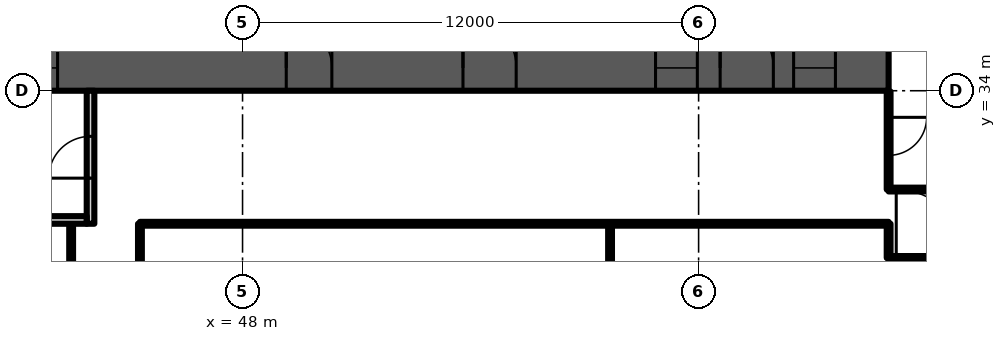
"""IFC4 building model, lengths in metres.
Left out: names, types, materials, properties, quantities, classifications, styles, units other than length and angle.
Written with IfcOpenShell. Run it as: python <this file> out.ifc"""

import sys

from ifc_helpers import new_model, si_unit, direction, frame, frame_2d, origin, place, context, subcontext, project, spatial, rectangle, extrude, element, fill, save


model = new_model("IFC4")
c1 = context("Model", 3, precision=1e-05, world=origin(), true_north=direction((0.0, 1.0)))
c2 = subcontext(c1, "Body", "Model", "MODEL_VIEW")
j1 = project(units=[si_unit("LENGTHUNIT", "METRE"), si_unit("PLANEANGLEUNIT", "RADIAN")], contexts=[c1])
p1 = place(None, origin())
s1 = spatial("IfcSite", under=j1, at=p1, CompositionType="ELEMENT")
p2 = place(p1, origin())
s2 = spatial("IfcBuilding", under=s1, at=p2, CompositionType="ELEMENT")
p3 = place(p2, frame((0.0, 0.0, 81.1)))
s3 = spatial("IfcBuildingStorey", under=s2, at=p3, CompositionType="ELEMENT", Elevation=81.1)
p4 = place(p3, frame((9.0, 34.6, 0.0), z_axis=(0.0, 0.0, 1.0), x_axis=(1.0, 0.0, 0.0)))
e1 = element("IfcWall", 1, at=p4, inside=s3, PredefinedType="SHEAR", context=c2, shape_type="SweptSolid", body=[
    extrude(rectangle(XDim=56.0, YDim=1.2, at=frame_2d((28.0, 0.0))), origin(), (0.0, 0.0, 1.0), 3.6),
])
p5 = place(p4, frame((2.0, 0.0, 0.0)))
e2 = element("IfcOpeningElement", 2, at=p5, cuts=e1, PredefinedType="OPENING", context=c2, shape_type="SweptSolid", body=[
    extrude(rectangle(XDim=1.0, YDim=2.1, at=frame_2d((0.5, 1.05))), frame((0.0, 0.61, 0.0), z_axis=(0.0, -1.0, 0.0), x_axis=(1.0, 0.0, 0.0)), (0.0, 0.0, 1.0), 1.22),
])
p6 = place(p4, frame((4.6, 0.0, 0.0)))
e3 = element("IfcOpeningElement", 3, at=p6, cuts=e1, PredefinedType="OPENING", context=c2, shape_type="SweptSolid", body=[
    extrude(rectangle(XDim=1.0, YDim=2.1, at=frame_2d((0.5, 1.05))), frame((0.0, 0.61, 0.0), z_axis=(0.0, -1.0, 0.0), x_axis=(1.0, 0.0, 0.0)), (0.0, 0.0, 1.0), 1.22),
])
p7 = place(p4, frame((7.867, 0.0, 0.0)))
e4 = element("IfcOpeningElement", 4, at=p7, cuts=e1, PredefinedType="OPENING", context=c2, shape_type="SweptSolid", body=[
    extrude(rectangle(XDim=1.1, YDim=2.1, at=frame_2d((0.55, 1.05))), frame((0.0, 0.61, 0.0), z_axis=(0.0, -1.0, 0.0), x_axis=(1.0, 0.0, 0.0)), (0.0, 0.0, 1.0), 1.22),
])
p8 = place(p4, frame((12.033, 0.0, 0.0)))
e5 = element("IfcOpeningElement", 5, at=p8, cuts=e1, PredefinedType="OPENING", context=c2, shape_type="SweptSolid", body=[
    extrude(rectangle(XDim=1.1, YDim=2.1, at=frame_2d((0.55, 1.05))), frame((0.0, 0.61, 0.0), z_axis=(0.0, -1.0, 0.0), x_axis=(1.0, 0.0, 0.0)), (0.0, 0.0, 1.0), 1.22),
])
p9 = place(p4, frame((9.8, 0.0, 0.0)))
e6 = element("IfcOpeningElement", 6, at=p9, cuts=e1, PredefinedType="OPENING", context=c2, shape_type="SweptSolid", body=[
    extrude(rectangle(XDim=1.4, YDim=2.1, at=frame_2d((0.7, 1.05))), frame((0.0, 0.61, 0.0), z_axis=(0.0, -1.0, 0.0), x_axis=(1.0, 0.0, 0.0)), (0.0, 0.0, 1.0), 1.22),
])
p10 = place(p4, frame((14.65, 0.0, 0.0)))
e7 = element("IfcOpeningElement", 7, at=p10, cuts=e1, PredefinedType="OPENING", context=c2, shape_type="SweptSolid", body=[
    extrude(rectangle(XDim=1.2, YDim=2.1, at=frame_2d((0.6, 1.05))), frame((0.0, 0.61, 0.0), z_axis=(0.0, -1.0, 0.0), x_axis=(1.0, 0.0, 0.0)), (0.0, 0.0, 1.0), 1.22),
])
p11 = place(p4, frame((21.867, 0.0, 0.0)))
e8 = element("IfcOpeningElement", 8, at=p11, cuts=e1, PredefinedType="OPENING", context=c2, shape_type="SweptSolid", body=[
    extrude(rectangle(XDim=1.1, YDim=2.1, at=frame_2d((0.55, 1.05))), frame((0.0, 0.61, 0.0), z_axis=(0.0, -1.0, 0.0), x_axis=(1.0, 0.0, 0.0)), (0.0, 0.0, 1.0), 1.22),
])
p12 = place(p4, frame((26.033, 0.0, 0.0)))
e9 = element("IfcOpeningElement", 9, at=p12, cuts=e1, PredefinedType="OPENING", context=c2, shape_type="SweptSolid", body=[
    extrude(rectangle(XDim=1.1, YDim=2.1, at=frame_2d((0.55, 1.05))), frame((0.0, 0.61, 0.0), z_axis=(0.0, -1.0, 0.0), x_axis=(1.0, 0.0, 0.0)), (0.0, 0.0, 1.0), 1.22),
])
p13 = place(p4, frame((23.8, 0.0, 0.0)))
e10 = element("IfcOpeningElement", 10, at=p13, cuts=e1, PredefinedType="OPENING", context=c2, shape_type="SweptSolid", body=[
    extrude(rectangle(XDim=1.4, YDim=2.1, at=frame_2d((0.7, 1.05))), frame((0.0, 0.61, 0.0), z_axis=(0.0, -1.0, 0.0), x_axis=(1.0, 0.0, 0.0)), (0.0, 0.0, 1.0), 1.22),
])
p14 = place(p4, frame((28.867, 0.0, 0.0)))
e11 = element("IfcOpeningElement", 11, at=p14, cuts=e1, PredefinedType="OPENING", context=c2, shape_type="SweptSolid", body=[
    extrude(rectangle(XDim=1.1, YDim=2.1, at=frame_2d((0.55, 1.05))), frame((0.0, 0.61, 0.0), z_axis=(0.0, -1.0, 0.0), x_axis=(1.0, 0.0, 0.0)), (0.0, 0.0, 1.0), 1.22),
])
p15 = place(p4, frame((33.033, 0.0, 0.0)))
e12 = element("IfcOpeningElement", 12, at=p15, cuts=e1, PredefinedType="OPENING", context=c2, shape_type="SweptSolid", body=[
    extrude(rectangle(XDim=1.1, YDim=2.1, at=frame_2d((0.55, 1.05))), frame((0.0, 0.61, 0.0), z_axis=(0.0, -1.0, 0.0), x_axis=(1.0, 0.0, 0.0)), (0.0, 0.0, 1.0), 1.22),
])
p16 = place(p4, frame((40.15, 0.0, 0.0)))
e13 = element("IfcOpeningElement", 13, at=p16, cuts=e1, PredefinedType="OPENING", context=c2, shape_type="SweptSolid", body=[
    extrude(rectangle(XDim=1.2, YDim=2.1, at=frame_2d((0.6, 1.05))), frame((0.0, 0.61, 0.0), z_axis=(0.0, -1.0, 0.0), x_axis=(1.0, 0.0, 0.0)), (0.0, 0.0, 1.0), 1.22),
])
p17 = place(p4, frame((44.8, 0.0, 0.0)))
e14 = element("IfcOpeningElement", 14, at=p17, cuts=e1, PredefinedType="OPENING", context=c2, shape_type="SweptSolid", body=[
    extrude(rectangle(XDim=1.4, YDim=2.1, at=frame_2d((0.7, 1.05))), frame((0.0, 0.61, 0.0), z_axis=(0.0, -1.0, 0.0), x_axis=(1.0, 0.0, 0.0)), (0.0, 0.0, 1.0), 1.22),
])
p18 = place(p4, frame((49.867, 0.0, 0.0)))
e15 = element("IfcOpeningElement", 15, at=p18, cuts=e1, PredefinedType="OPENING", context=c2, shape_type="SweptSolid", body=[
    extrude(rectangle(XDim=1.1, YDim=2.1, at=frame_2d((0.55, 1.05))), frame((0.0, 0.61, 0.0), z_axis=(0.0, -1.0, 0.0), x_axis=(1.0, 0.0, 0.0)), (0.0, 0.0, 1.0), 1.22),
])
p19 = place(p4, frame((53.5, 0.0, 0.0)))
e16 = element("IfcOpeningElement", 16, at=p19, cuts=e1, PredefinedType="OPENING", context=c2, shape_type="SweptSolid", body=[
    extrude(rectangle(XDim=1.1, YDim=2.1, at=frame_2d((0.55, 1.05))), frame((0.0, 0.61, 0.0), z_axis=(0.0, -1.0, 0.0), x_axis=(1.0, 0.0, 0.0)), (0.0, 0.0, 1.0), 1.22),
])
p20 = place(p4, frame((51.567, 0.0, 0.0)))
e17 = element("IfcOpeningElement", 17, at=p20, cuts=e1, PredefinedType="OPENING", context=c2, shape_type="SweptSolid", body=[
    extrude(rectangle(XDim=1.4, YDim=2.1, at=frame_2d((0.7, 1.05))), frame((0.0, 0.61, 0.0), z_axis=(0.0, -1.0, 0.0), x_axis=(1.0, 0.0, 0.0)), (0.0, 0.0, 1.0), 1.22),
])
p21 = place(p3, frame((44.0, 30.5, 0.0), z_axis=(0.0, 0.0, 1.0), x_axis=(0.0, 1.0, 0.0)))
e18 = element("IfcWall", 18, at=p21, inside=s3, PredefinedType="PARTITIONING", context=c2, shape_type="SweptSolid", body=[
    extrude(rectangle(XDim=3.5, YDim=0.2, at=frame_2d((1.75, 0.0))), origin(), (0.0, 0.0, 1.0), 3.2),
])
p22 = place(p21, frame((1.2, 0.0, 0.0)))
e19 = element("IfcOpeningElement", 19, at=p22, cuts=e18, PredefinedType="OPENING", context=c2, shape_type="SweptSolid", body=[
    extrude(rectangle(XDim=1.1, YDim=2.1, at=frame_2d((0.55, 1.05))), frame((0.0, 0.11, 0.0), z_axis=(0.0, -1.0, 0.0), x_axis=(1.0, 0.0, 0.0)), (0.0, 0.0, 1.0), 0.22),
])
p23 = place(p3, frame((41.1, 30.6, 0.0), z_axis=(0.0, 0.0, 1.0), x_axis=(1.0, 0.0, 0.0)))
e20 = element("IfcWall", 20, at=p23, inside=s3, PredefinedType="PARTITIONING", context=c2, shape_type="SweptSolid", body=[
    extrude(rectangle(XDim=2.8, YDim=0.2, at=frame_2d((1.4, 0.0))), origin(), (0.0, 0.0, 1.0), 3.2),
])
p24 = place(p3, frame((43.49, 13.24, 0.0), z_axis=(0.0, 0.0, 1.0), x_axis=(0.0, 1.0, 0.0)))
e21 = element("IfcWall", 21, at=p24, inside=s3, PredefinedType="PARTITIONING", context=c2, shape_type="SweptSolid", body=[
    extrude(rectangle(XDim=17.25, YDim=0.1, at=frame_2d((8.625, 0.0))), origin(), (0.0, 0.0, 1.0), 3.2),
])
p25 = place(p24, frame((8.139, 0.0, 0.0)))
e22 = element("IfcOpeningElement", 22, at=p25, cuts=e21, PredefinedType="OPENING", context=c2, shape_type="SweptSolid", body=[
    extrude(rectangle(XDim=1.0, YDim=2.1, at=frame_2d((0.5, 1.05))), frame((0.0, 0.06, 0.0), z_axis=(0.0, -1.0, 0.0), x_axis=(1.0, 0.0, 0.0)), (0.0, 0.0, 1.0), 0.12),
])
p26 = place(p3, frame((45.3, -3.943, 0.0), z_axis=(0.0, 0.0, 1.0), x_axis=(0.0, 1.0, 0.0)))
e23 = element("IfcWall", 23, at=p26, inside=s3, PredefinedType="PARTITIONING", context=c2, shape_type="SweptSolid", body=[
    extrude(rectangle(XDim=34.443, YDim=0.1, at=frame_2d((17.222, 0.0))), origin(), (0.0, 0.0, 1.0), 2.58),
])
p27 = place(p26, frame((1.598, 0.0, 0.0)))
e24 = element("IfcOpeningElement", 24, at=p27, cuts=e23, PredefinedType="OPENING", context=c2, shape_type="SweptSolid", body=[
    extrude(rectangle(XDim=1.0, YDim=2.1, at=frame_2d((0.5, 1.05))), frame((0.0, 0.06, 0.0), z_axis=(0.0, -1.0, 0.0), x_axis=(1.0, 0.0, 0.0)), (0.0, 0.0, 1.0), 0.12),
])
p28 = place(p26, frame((5.853, 0.0, 0.0)))
e25 = element("IfcOpeningElement", 25, at=p28, cuts=e23, PredefinedType="OPENING", context=c2, shape_type="SweptSolid", body=[
    extrude(rectangle(XDim=1.0, YDim=2.1, at=frame_2d((0.5, 1.05))), frame((0.0, 0.06, 0.0), z_axis=(0.0, -1.0, 0.0), x_axis=(1.0, 0.0, 0.0)), (0.0, 0.0, 1.0), 0.12),
])
p29 = place(p26, frame((10.173, 0.0, 0.0)))
e26 = element("IfcOpeningElement", 26, at=p29, cuts=e23, PredefinedType="OPENING", context=c2, shape_type="SweptSolid", body=[
    extrude(rectangle(XDim=1.0, YDim=2.1, at=frame_2d((0.5, 1.05))), frame((0.0, 0.06, 0.0), z_axis=(0.0, -1.0, 0.0), x_axis=(1.0, 0.0, 0.0)), (0.0, 0.0, 1.0), 0.12),
])
p30 = place(p26, frame((14.488, 0.0, 0.0)))
e27 = element("IfcOpeningElement", 27, at=p30, cuts=e23, PredefinedType="OPENING", context=c2, shape_type="SweptSolid", body=[
    extrude(rectangle(XDim=1.0, YDim=2.1, at=frame_2d((0.5, 1.05))), frame((0.0, 0.06, 0.0), z_axis=(0.0, -1.0, 0.0), x_axis=(1.0, 0.0, 0.0)), (0.0, 0.0, 1.0), 0.12),
])
p31 = place(p26, frame((31.403, 0.0, 0.0)))
e28 = element("IfcOpeningElement", 28, at=p31, cuts=e23, PredefinedType="OPENING", context=c2, shape_type="SweptSolid", body=[
    extrude(rectangle(XDim=1.0, YDim=2.1, at=frame_2d((0.5, 1.05))), frame((0.0, 0.06, 0.0), z_axis=(0.0, -1.0, 0.0), x_axis=(1.0, 0.0, 0.0)), (0.0, 0.0, 1.0), 0.12),
])
p32 = place(p3, frame((45.3, 30.5, 0.0), z_axis=(0.0, 0.0, 1.0), x_axis=(1.0, 0.0, 0.0)))
e29 = element("IfcWall", 29, at=p32, inside=s3, PredefinedType="PARTITIONING", context=c2, shape_type="SweptSolid", body=[
    extrude(rectangle(XDim=19.7, YDim=0.1, at=frame_2d((9.85, 0.0))), origin(), (0.0, 0.0, 1.0), 3.2),
])
p33 = place(p3, frame((57.67, 13.24, 0.0), z_axis=(0.0, 0.0, 1.0), x_axis=(0.0, 1.0, 0.0)))
e30 = element("IfcWall", 30, at=p33, inside=s3, PredefinedType="PARTITIONING", context=c2, shape_type="SweptSolid", body=[
    extrude(rectangle(XDim=17.26, YDim=0.1, at=frame_2d((8.63, 0.0))), origin(), (0.0, 0.0, 1.0), 3.2),
])
p34 = place(p3, frame((65.0, 29.6, 0.0), z_axis=(0.0, 0.0, 1.0), x_axis=(0.0, 1.0, 0.0)))
e31 = element("IfcWall", 31, at=p34, inside=s3, PredefinedType="PARTITIONING", context=c2, shape_type="SweptSolid", body=[
    extrude(rectangle(XDim=0.9, YDim=0.1, at=frame_2d((0.45, 0.0))), origin(), (0.0, 0.0, 1.0), 3.2),
])
p35 = place(p3, frame((65.0, 29.6, 0.0), z_axis=(0.0, 0.0, 1.0), x_axis=(1.0, 0.0, 0.0)))
e32 = element("IfcWall", 32, at=p35, inside=s3, PredefinedType="PARTITIONING", context=c2, shape_type="SweptSolid", body=[
    extrude(rectangle(XDim=4.425, YDim=0.1, at=frame_2d((2.212, 0.0))), origin(), (0.0, 0.0, 1.0), 3.2),
])
p36 = place(p35, frame((0.2, 0.0, 0.0)))
e33 = element("IfcOpeningElement", 33, at=p36, cuts=e32, PredefinedType="OPENING", context=c2, shape_type="SweptSolid", body=[
    extrude(rectangle(XDim=1.8, YDim=2.1, at=frame_2d((0.9, 1.05))), frame((0.0, 0.06, 0.0), z_axis=(0.0, -1.0, 0.0), x_axis=(1.0, 0.0, 0.0)), (0.0, 0.0, 1.0), 0.12),
])
p37 = place(p3, frame((65.0, 31.4, 0.0), z_axis=(0.0, 0.0, 1.0), x_axis=(0.0, 1.0, 0.0)))
e34 = element("IfcWall", 34, at=p37, inside=s3, PredefinedType="PARTITIONING", context=c2, shape_type="SweptSolid", body=[
    extrude(rectangle(XDim=2.58, YDim=0.1, at=frame_2d((1.29, 0.0))), origin(), (0.0, 0.0, 1.0), 3.2),
])
p38 = place(p37, frame((0.9, 0.0, 0.0)))
e35 = element("IfcOpeningElement", 35, at=p38, cuts=e34, PredefinedType="OPENING", context=c2, shape_type="SweptSolid", body=[
    extrude(rectangle(XDim=1.0, YDim=2.1, at=frame_2d((0.5, 1.05))), frame((0.0, 0.06, 0.0), z_axis=(0.0, -1.0, 0.0), x_axis=(1.0, 0.0, 0.0)), (0.0, 0.0, 1.0), 0.12),
])
p39 = place(p3, frame((65.0, 31.4, 0.0), z_axis=(0.0, 0.0, 1.0), x_axis=(1.0, 0.0, 0.0)))
e36 = element("IfcWall", 36, at=p39, inside=s3, PredefinedType="PARTITIONING", context=c2, shape_type="SweptSolid", body=[
    extrude(rectangle(XDim=7.81, YDim=0.1, at=frame_2d((3.905, 0.0))), origin(), (0.0, 0.0, 1.0), 3.2),
])
p40 = place(p39, frame((6.657, 0.0, 0.0)))
e37 = element("IfcOpeningElement", 37, at=p40, cuts=e36, PredefinedType="OPENING", context=c2, shape_type="SweptSolid", body=[
    extrude(rectangle(XDim=1.0, YDim=2.1, at=frame_2d((0.5, 1.05))), frame((0.0, 0.06, 0.0), z_axis=(0.0, -1.0, 0.0), x_axis=(1.0, 0.0, 0.0)), (0.0, 0.0, 1.0), 0.12),
])
p41 = place(p15, origin())
e38 = element("IfcDoor", 38, at=p41, inside=s3, OperationType="DOUBLE_DOOR_SLIDING", PredefinedType="DOOR", context=c2, shape_type="SweptSolid", body=[
    extrude(rectangle(XDim=1.1, YDim=2.1, at=frame_2d((0.55, 1.05))), frame((0.0, 0.025, 0.0), z_axis=(0.0, -1.0, 0.0), x_axis=(1.0, 0.0, 0.0)), (0.0, 0.0, 1.0), 0.05),
])
fill(e12, e38)
p42 = place(p16, origin())
e39 = element("IfcDoor", 39, at=p42, inside=s3, OperationType="SINGLE_SWING_LEFT", PredefinedType="DOOR", context=c2, shape_type="SweptSolid", body=[
    extrude(rectangle(XDim=1.2, YDim=2.1, at=frame_2d((0.6, 1.05))), frame((0.0, 0.025, 0.0), z_axis=(0.0, -1.0, 0.0), x_axis=(1.0, 0.0, 0.0)), (0.0, 0.0, 1.0), 0.05),
])
fill(e13, e39)
p43 = place(p17, origin())
e40 = element("IfcDoor", 40, at=p43, inside=s3, OperationType="DOUBLE_DOOR_SINGLE_SWING", PredefinedType="DOOR", context=c2, shape_type="SweptSolid", body=[
    extrude(rectangle(XDim=1.4, YDim=2.1, at=frame_2d((0.7, 1.05))), frame((0.0, 0.025, 0.0), z_axis=(0.0, -1.0, 0.0), x_axis=(1.0, 0.0, 0.0)), (0.0, 0.0, 1.0), 0.05),
])
fill(e14, e40)
p44 = place(p18, origin())
e41 = element("IfcDoor", 41, at=p44, inside=s3, OperationType="DOUBLE_DOOR_SLIDING", PredefinedType="DOOR", context=c2, shape_type="SweptSolid", body=[
    extrude(rectangle(XDim=1.1, YDim=2.1, at=frame_2d((0.55, 1.05))), frame((0.0, 0.025, 0.0), z_axis=(0.0, -1.0, 0.0), x_axis=(1.0, 0.0, 0.0)), (0.0, 0.0, 1.0), 0.05),
])
fill(e15, e41)
p45 = place(p19, origin())
e42 = element("IfcDoor", 42, at=p45, inside=s3, OperationType="DOUBLE_DOOR_SLIDING", PredefinedType="DOOR", context=c2, shape_type="SweptSolid", body=[
    extrude(rectangle(XDim=1.1, YDim=2.1, at=frame_2d((0.55, 1.05))), frame((0.0, 0.025, 0.0), z_axis=(0.0, -1.0, 0.0), x_axis=(1.0, 0.0, 0.0)), (0.0, 0.0, 1.0), 0.05),
])
fill(e16, e42)
p46 = place(p20, origin())
e43 = element("IfcDoor", 43, at=p46, inside=s3, OperationType="DOUBLE_DOOR_SINGLE_SWING", PredefinedType="DOOR", context=c2, shape_type="SweptSolid", body=[
    extrude(rectangle(XDim=1.4, YDim=2.1, at=frame_2d((0.7, 1.05))), frame((0.0, 0.025, 0.0), z_axis=(0.0, -1.0, 0.0), x_axis=(1.0, 0.0, 0.0)), (0.0, 0.0, 1.0), 0.05),
])
fill(e17, e43)
p47 = place(p22, origin())
e44 = element("IfcDoor", 44, at=p47, inside=s3, OperationType="SINGLE_SWING_LEFT", PredefinedType="DOOR", context=c2, shape_type="SweptSolid", body=[
    extrude(rectangle(XDim=1.1, YDim=2.1, at=frame_2d((0.55, 1.05))), frame((0.0, 0.025, 0.0), z_axis=(0.0, -1.0, 0.0), x_axis=(1.0, 0.0, 0.0)), (0.0, 0.0, 1.0), 0.05),
])
fill(e19, e44)
p48 = place(p36, origin())
e45 = element("IfcDoor", 45, at=p48, inside=s3, OperationType="DOUBLE_DOOR_SINGLE_SWING", PredefinedType="DOOR", context=c2, shape_type="SweptSolid", body=[
    extrude(rectangle(XDim=1.8, YDim=2.1, at=frame_2d((0.9, 1.05))), frame((0.0, 0.025, 0.0), z_axis=(0.0, -1.0, 0.0), x_axis=(1.0, 0.0, 0.0)), (0.0, 0.0, 1.0), 0.05),
])
fill(e33, e45)
p49 = place(p38, origin())
e46 = element("IfcDoor", 46, at=p49, inside=s3, OperationType="SINGLE_SWING_RIGHT", PredefinedType="DOOR", context=c2, shape_type="SweptSolid", body=[
    extrude(rectangle(XDim=1.0, YDim=2.1, at=frame_2d((0.5, 1.05))), frame((0.0, 0.025, 0.0), z_axis=(0.0, -1.0, 0.0), x_axis=(1.0, 0.0, 0.0)), (0.0, 0.0, 1.0), 0.05),
])
fill(e35, e46)
save(model, sys.argv[1])
